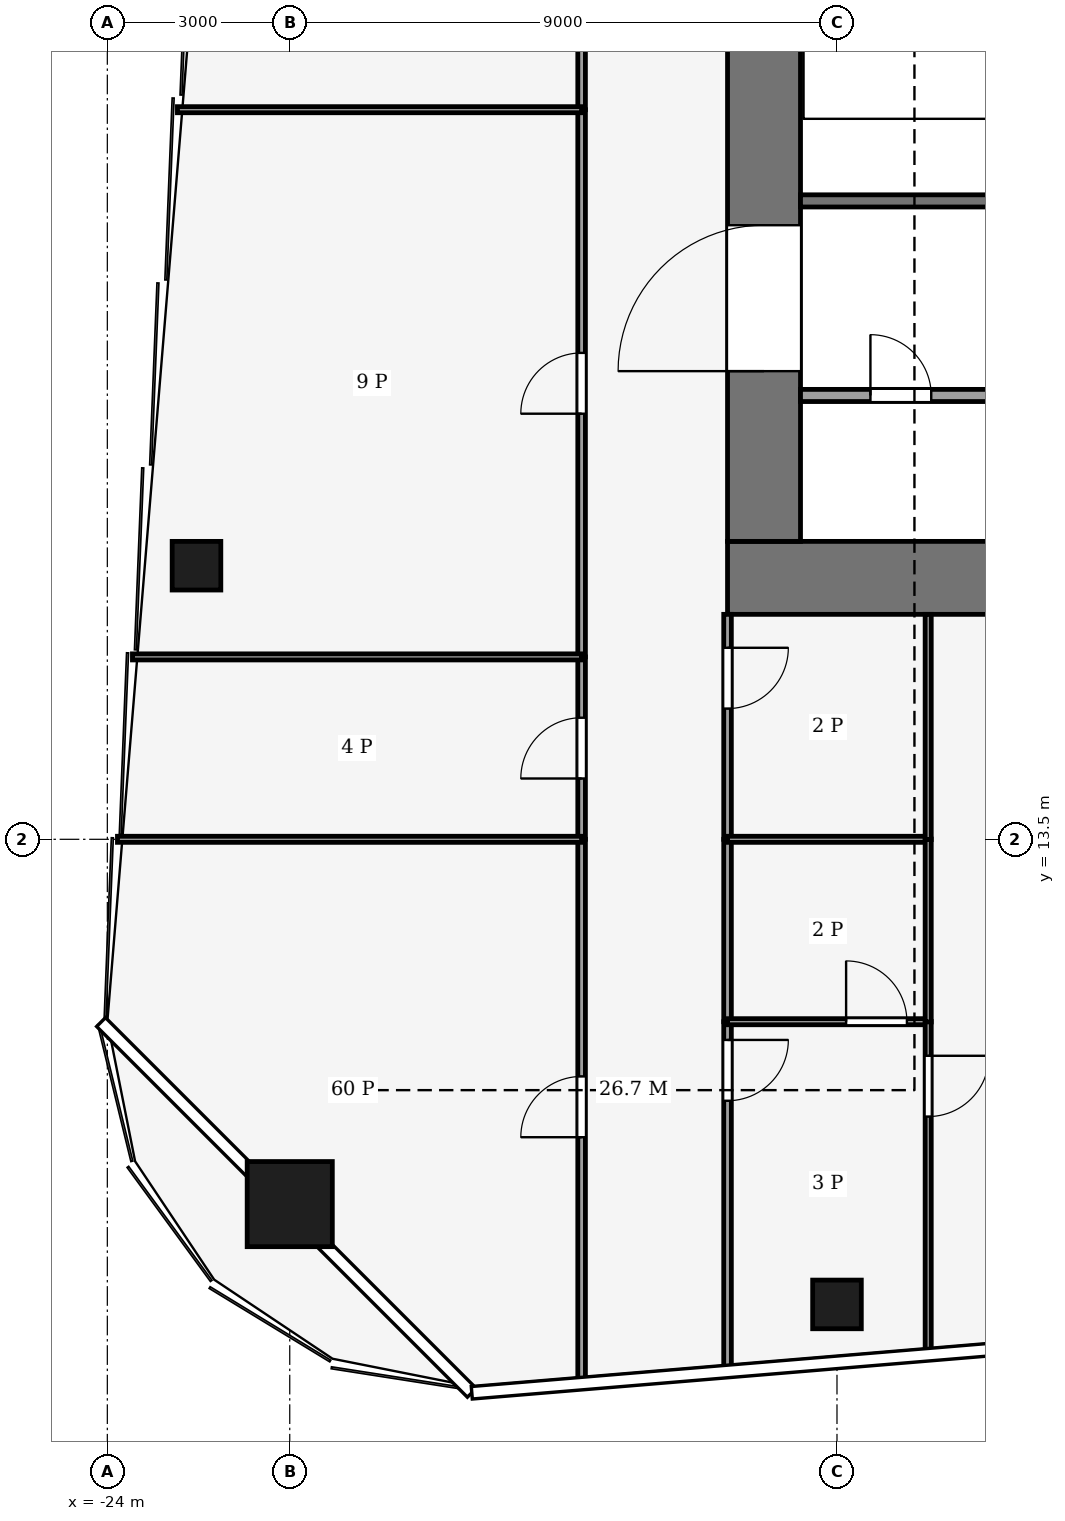
"""IFC4 building model, lengths in metres.
Left out: names, types, materials, properties, quantities, classifications, styles, units other than length and angle.
Written with IfcOpenShell. Run it as: python <this file> out.ifc"""

import sys

from ifc_helpers import new_model, si_unit, direction, frame, frame_2d, origin, origin_2d, place, context, subcontext, project, spatial, rectangle, hollow_rectangle, extrude, element, fill, save


model = new_model("IFC4")
c1 = context("Model", 3, precision=1e-05, world=origin(), true_north=direction((0.0, 1.0)))
c2 = subcontext(c1, "Body", "Model", "MODEL_VIEW")
j1 = project(units=[si_unit("LENGTHUNIT", "METRE"), si_unit("PLANEANGLEUNIT", "RADIAN")], contexts=[c1])
p1 = place(None, origin())
s1 = spatial("IfcSite", under=j1, at=p1, CompositionType="ELEMENT")
p2 = place(p1, origin())
s2 = spatial("IfcBuilding", under=s1, at=p2, CompositionType="ELEMENT")
p3 = place(p2, frame((0.0, 0.0, 90.0)))
s3 = spatial("IfcBuildingStorey", under=s2, at=p3, CompositionType="ELEMENT", Elevation=90.0)
p4 = place(p3, frame((-13.8, 17.8, -0.13), z_axis=(0.0, 0.0, 1.0), x_axis=(1.0, 0.0, 0.0)))
e1 = element("IfcWall", 1, at=p4, inside=s3, PredefinedType="SHEAR", context=c2, shape_type="SweptSolid", body=[
    extrude(rectangle(XDim=27.6, YDim=1.2, at=frame_2d((13.8, 0.0))), origin(), (0.0, 0.0, 1.0), 4.0),
])
p5 = place(p3, frame((-13.2, 18.4, -0.13), z_axis=(0.0, 0.0, 1.0), x_axis=(0.0, 1.0, 0.0)))
e2 = element("IfcWall", 2, at=p5, inside=s3, PredefinedType="SHEAR", context=c2, shape_type="SweptSolid", body=[
    extrude(rectangle(XDim=19.2, YDim=1.2, at=frame_2d((9.6, 0.0))), origin(), (0.0, 0.0, 1.0), 4.0),
])
p6 = place(p5, frame((2.8, 0.0, 0.13)))
e3 = element("IfcOpeningElement", 3, at=p6, cuts=e2, PredefinedType="OPENING", context=c2, shape_type="SweptSolid", body=[
    extrude(rectangle(XDim=2.4, YDim=2.4, at=frame_2d((1.2, 1.2))), frame((0.0, 0.61, 0.0), z_axis=(0.0, -1.0, 0.0), x_axis=(1.0, 0.0, 0.0)), (0.0, 0.0, 1.0), 1.22),
])
p7 = place(p5, frame((13.4, 0.0, 0.13)))
e4 = element("IfcOpeningElement", 4, at=p7, cuts=e2, PredefinedType="OPENING", context=c2, shape_type="SweptSolid", body=[
    extrude(rectangle(XDim=1.4, YDim=2.2, at=frame_2d((0.7, 1.1))), frame((0.0, 0.61, 0.0), z_axis=(0.0, -1.0, 0.0), x_axis=(1.0, 0.0, 0.0)), (0.0, 0.0, 1.0), 1.22),
])
p8 = place(p3, frame((-21.0, 7.5, 0.0), z_axis=(0.0, 0.0, 1.0), x_axis=(1.0, 0.0, 0.0)))
e5 = element("IfcColumn", 5, at=p8, inside=s3, PredefinedType="COLUMN", context=c2, shape_type="SweptSolid", body=[
    extrude(hollow_rectangle(XDim=1.4, YDim=1.4, WallThickness=0.08, at=origin_2d()), origin(), (0.0, 0.0, 1.0), 4.0),
])
for number, where, z_axis, x_axis in (
    (6, (-12.0, 5.85, 0.0), (0.0, 0.0, 1.0), (1.0, 0.0, 0.0)),
    (7, (-22.534, 18.0, 0.0), (0.0, 0.0, 1.0), (1.0, 0.0, 0.0)),
):
    element("IfcColumn", number, at=place(p3, frame(where, z_axis=z_axis, x_axis=x_axis)), inside=s3, PredefinedType="COLUMN", context=c2, shape_type="SweptSolid", body=[
        extrude(hollow_rectangle(XDim=0.8, YDim=0.8, WallThickness=0.04, at=origin_2d()), origin(), (0.0, 0.0, 1.0), 4.0),
    ])
p9 = place(p3, frame((-12.6, 20.8, 0.0), z_axis=(0.0, 0.0, 1.0), x_axis=(1.0, 0.0, 0.0)))
e8 = element("IfcWall", 8, at=p9, inside=s3, PredefinedType="PARTITIONING", context=c2, shape_type="SweptSolid", body=[
    extrude(rectangle(XDim=6.6, YDim=0.2, at=frame_2d((3.3, 0.0))), origin(), (0.0, 0.0, 1.0), 3.87),
])
p10 = place(p9, frame((1.15, 0.0, 0.0)))
e9 = element("IfcOpeningElement", 9, at=p10, cuts=e8, PredefinedType="OPENING", context=c2, shape_type="SweptSolid", body=[
    extrude(rectangle(XDim=1.0, YDim=2.1, at=frame_2d((0.5, 1.05))), frame((0.0, 0.11, 0.0), z_axis=(0.0, -1.0, 0.0), x_axis=(1.0, 0.0, 0.0)), (0.0, 0.0, 1.0), 0.22),
])
p11 = place(p9, frame((4.45, 0.0, 0.0)))
e10 = element("IfcOpeningElement", 10, at=p11, cuts=e8, PredefinedType="OPENING", context=c2, shape_type="SweptSolid", body=[
    extrude(rectangle(XDim=1.0, YDim=2.1, at=frame_2d((0.5, 1.05))), frame((0.0, 0.11, 0.0), z_axis=(0.0, -1.0, 0.0), x_axis=(1.0, 0.0, 0.0)), (0.0, 0.0, 1.0), 0.22),
])
p12 = place(p3, frame((-12.6, 24.0, 0.0), z_axis=(0.0, 0.0, 1.0), x_axis=(1.0, 0.0, 0.0)))
e11 = element("IfcWall", 11, at=p12, inside=s3, PredefinedType="PARTITIONING", context=c2, shape_type="SweptSolid", body=[
    extrude(rectangle(XDim=6.6, YDim=0.2, at=frame_2d((3.3, 0.0))), origin(), (0.0, 0.0, 1.0), 3.87),
])
p13 = place(p12, frame((4.1, 0.0, 0.0)))
e12 = element("IfcOpeningElement", 12, at=p13, cuts=e11, PredefinedType="OPENING", context=c2, shape_type="SweptSolid", body=[
    extrude(rectangle(XDim=0.8, YDim=2.1, at=frame_2d((0.4, 1.05))), frame((0.0, 0.11, 0.0), z_axis=(0.0, -1.0, 0.0), x_axis=(1.0, 0.0, 0.0)), (0.0, 0.0, 1.0), 0.22),
])
p14 = place(p12, frame((5.5, 0.0, 0.0)))
e13 = element("IfcOpeningElement", 13, at=p14, cuts=e11, PredefinedType="OPENING", context=c2, shape_type="SweptSolid", body=[
    extrude(rectangle(XDim=0.8, YDim=2.1, at=frame_2d((0.4, 1.05))), frame((0.0, 0.11, 0.0), z_axis=(0.0, -1.0, 0.0), x_axis=(1.0, 0.0, 0.0)), (0.0, 0.0, 1.0), 0.22),
])
p15 = place(p3, frame((-16.2, 4.57, 0.0), z_axis=(0.0, 0.0, 1.0), x_axis=(0.0, 1.0, 0.0)))
e14 = element("IfcWall", 14, at=p15, inside=s3, PredefinedType="PARTITIONING", context=c2, shape_type="SweptSolid", body=[
    extrude(rectangle(XDim=8.93, YDim=0.125, at=frame_2d((4.465, 0.0))), origin(), (0.0, 0.0, 1.0), 3.04),
])
p16 = place(p15, frame((4.03, 0.0, 0.0)))
e15 = element("IfcOpeningElement", 15, at=p16, cuts=e14, PredefinedType="OPENING", context=c2, shape_type="SweptSolid", body=[
    extrude(rectangle(XDim=1.0, YDim=2.1, at=frame_2d((0.5, 1.05))), frame((0.0, 0.073, 0.0), z_axis=(0.0, -1.0, 0.0), x_axis=(1.0, 0.0, 0.0)), (0.0, 0.0, 1.0), 0.145),
])
p17 = place(p3, frame((-16.2, 13.5, 0.0), z_axis=(0.0, 0.0, 1.0), x_axis=(0.0, 1.0, 0.0)))
e16 = element("IfcWall", 16, at=p17, inside=s3, PredefinedType="PARTITIONING", context=c2, shape_type="SweptSolid", body=[
    extrude(rectangle(XDim=3.0, YDim=0.125, at=frame_2d((1.5, 0.0))), origin(), (0.0, 0.0, 1.0), 3.87),
])
p18 = place(p17, frame((1.0, 0.0, 0.0)))
e17 = element("IfcOpeningElement", 17, at=p18, cuts=e16, PredefinedType="OPENING", context=c2, shape_type="SweptSolid", body=[
    extrude(rectangle(XDim=1.0, YDim=2.1, at=frame_2d((0.5, 1.05))), frame((0.0, 0.073, 0.0), z_axis=(0.0, -1.0, 0.0), x_axis=(1.0, 0.0, 0.0)), (0.0, 0.0, 1.0), 0.145),
])
p19 = place(p3, frame((-16.2, 16.5, 0.0), z_axis=(0.0, 0.0, 1.0), x_axis=(0.0, 1.0, 0.0)))
e18 = element("IfcWall", 18, at=p19, inside=s3, PredefinedType="PARTITIONING", context=c2, shape_type="SweptSolid", body=[
    extrude(rectangle(XDim=9.0, YDim=0.125, at=frame_2d((4.5, 0.0))), origin(), (0.0, 0.0, 1.0), 3.14),
])
p20 = place(p19, frame((4.0, 0.0, 0.0)))
e19 = element("IfcOpeningElement", 19, at=p20, cuts=e18, PredefinedType="OPENING", context=c2, shape_type="SweptSolid", body=[
    extrude(rectangle(XDim=1.0, YDim=2.1, at=frame_2d((0.5, 1.05))), frame((0.0, 0.073, 0.0), z_axis=(0.0, -1.0, 0.0), x_axis=(1.0, 0.0, 0.0)), (0.0, 0.0, 1.0), 0.145),
])
p21 = place(p3, frame((-16.2, 25.5, 0.0), z_axis=(0.0, 0.0, 1.0), x_axis=(0.0, 1.0, 0.0)))
e20 = element("IfcWall", 20, at=p21, inside=s3, PredefinedType="PARTITIONING", context=c2, shape_type="SweptSolid", body=[
    extrude(rectangle(XDim=12.0, YDim=0.125, at=frame_2d((6.0, 0.0))), origin(), (0.0, 0.0, 1.0), 3.48),
])
p22 = place(p21, frame((5.5, 0.0, 0.0)))
e21 = element("IfcOpeningElement", 21, at=p22, cuts=e20, PredefinedType="OPENING", context=c2, shape_type="SweptSolid", body=[
    extrude(rectangle(XDim=1.0, YDim=2.1, at=frame_2d((0.5, 1.05))), frame((0.0, 0.073, 0.0), z_axis=(0.0, -1.0, 0.0), x_axis=(1.0, 0.0, 0.0)), (0.0, 0.0, 1.0), 0.145),
])
p23 = place(p3, frame((-13.8, 10.5, 0.0), z_axis=(0.0, 0.0, 1.0), x_axis=(0.0, -1.0, 0.0)))
e22 = element("IfcWall", 22, at=p23, inside=s3, PredefinedType="PARTITIONING", context=c2, shape_type="SweptSolid", body=[
    extrude(rectangle(XDim=5.73, YDim=0.125, at=frame_2d((2.865, 0.0))), origin(), (0.0, 0.0, 1.0), 3.04),
])
p24 = place(p23, frame((0.3, 0.0, 0.0)))
e23 = element("IfcOpeningElement", 23, at=p24, cuts=e22, PredefinedType="OPENING", context=c2, shape_type="SweptSolid", body=[
    extrude(rectangle(XDim=1.0, YDim=2.1, at=frame_2d((0.5, 1.05))), frame((0.0, 0.073, 0.0), z_axis=(0.0, -1.0, 0.0), x_axis=(1.0, 0.0, 0.0)), (0.0, 0.0, 1.0), 0.145),
])
p25 = place(p3, frame((-13.8, 10.5, 0.0), z_axis=(0.0, 0.0, 1.0), x_axis=(0.0, 1.0, 0.0)))
e24 = element("IfcWall", 24, at=p25, inside=s3, PredefinedType="PARTITIONING", context=c2, shape_type="SweptSolid", body=[
    extrude(rectangle(XDim=3.0, YDim=0.125, at=frame_2d((1.5, 0.0))), origin(), (0.0, 0.0, 1.0), 3.87),
])
p26 = place(p3, frame((-13.8, 17.2, 0.0), z_axis=(0.0, 0.0, 1.0), x_axis=(0.0, -1.0, 0.0)))
e25 = element("IfcWall", 25, at=p26, inside=s3, PredefinedType="PARTITIONING", context=c2, shape_type="SweptSolid", body=[
    extrude(rectangle(XDim=3.7, YDim=0.125, at=frame_2d((1.85, 0.0))), origin(), (0.0, 0.0, 1.0), 3.14),
])
p27 = place(p26, frame((0.55, 0.0, 0.0)))
e26 = element("IfcOpeningElement", 26, at=p27, cuts=e25, PredefinedType="OPENING", context=c2, shape_type="SweptSolid", body=[
    extrude(rectangle(XDim=1.0, YDim=2.1, at=frame_2d((0.5, 1.05))), frame((0.0, 0.073, 0.0), z_axis=(0.0, -1.0, 0.0), x_axis=(1.0, 0.0, 0.0)), (0.0, 0.0, 1.0), 0.145),
])
p28 = place(p3, frame((-16.2, 13.5, 0.0), z_axis=(0.0, 0.0, 1.0), x_axis=(-1.0, 0.0, 0.0)))
e27 = element("IfcWall", 27, at=p28, inside=s3, PredefinedType="PARTITIONING", context=c2, shape_type="SweptSolid", body=[
    extrude(rectangle(XDim=7.634, YDim=0.1, at=frame_2d((3.817, 0.0))), origin(), (0.0, 0.0, 1.0), 3.04),
])
p29 = place(p3, frame((-16.2, 16.5, 0.0), z_axis=(0.0, 0.0, 1.0), x_axis=(-1.0, 0.0, 0.0)))
e28 = element("IfcWall", 28, at=p29, inside=s3, PredefinedType="PARTITIONING", context=c2, shape_type="SweptSolid", body=[
    extrude(rectangle(XDim=7.387, YDim=0.1, at=frame_2d((3.693, 0.0))), origin(), (0.0, 0.0, 1.0), 3.04),
])
p30 = place(p3, frame((-16.2, 25.5, 0.0), z_axis=(0.0, 0.0, 1.0), x_axis=(-1.0, 0.0, 0.0)))
e29 = element("IfcWall", 29, at=p30, inside=s3, PredefinedType="PARTITIONING", context=c2, shape_type="SweptSolid", body=[
    extrude(rectangle(XDim=6.647, YDim=0.1, at=frame_2d((3.324, 0.0))), origin(), (0.0, 0.0, 1.0), 3.04),
])
p31 = place(p3, frame((-13.8, 10.5, 0.0), z_axis=(0.0, 0.0, 1.0), x_axis=(1.0, 0.0, 0.0)))
e30 = element("IfcWall", 30, at=p31, inside=s3, PredefinedType="PARTITIONING", context=c2, shape_type="SweptSolid", body=[
    extrude(rectangle(XDim=3.3, YDim=0.1, at=frame_2d((1.65, 0.0))), origin(), (0.0, 0.0, 1.0), 3.44),
])
p32 = place(p31, frame((1.95, 0.0, 0.0)))
e31 = element("IfcOpeningElement", 31, at=p32, cuts=e30, PredefinedType="OPENING", context=c2, shape_type="SweptSolid", body=[
    extrude(rectangle(XDim=1.0, YDim=2.1, at=frame_2d((0.5, 1.05))), frame((0.0, 0.06, 0.0), z_axis=(0.0, -1.0, 0.0), x_axis=(1.0, 0.0, 0.0)), (0.0, 0.0, 1.0), 0.12),
])
p33 = place(p3, frame((-10.5, 10.504, 0.0), z_axis=(0.0, 0.0, 1.0), x_axis=(0.0, -1.0, 0.0)))
e32 = element("IfcWall", 32, at=p33, inside=s3, PredefinedType="PARTITIONING", context=c2, shape_type="SweptSolid", body=[
    extrude(rectangle(XDim=5.459, YDim=0.1, at=frame_2d((2.729, 0.0))), origin(), (0.0, 0.0, 1.0), 3.04),
])
p34 = place(p33, frame((0.564, 0.0, 0.0)))
e33 = element("IfcOpeningElement", 33, at=p34, cuts=e32, PredefinedType="OPENING", context=c2, shape_type="SweptSolid", body=[
    extrude(rectangle(XDim=1.0, YDim=2.1, at=frame_2d((0.5, 1.05))), frame((0.0, 0.06, 0.0), z_axis=(0.0, -1.0, 0.0), x_axis=(1.0, 0.0, 0.0)), (0.0, 0.0, 1.0), 0.12),
])
p35 = place(p3, frame((-10.5, 13.5, 0.0), z_axis=(0.0, 0.0, 1.0), x_axis=(-1.0, 0.0, 0.0)))
e34 = element("IfcWall", 34, at=p35, inside=s3, PredefinedType="PARTITIONING", context=c2, shape_type="SweptSolid", body=[
    extrude(rectangle(XDim=3.3, YDim=0.1, at=frame_2d((1.65, 0.0))), origin(), (0.0, 0.0, 1.0), 3.44),
])
p36 = place(p3, frame((-10.5, 10.496, 0.0), z_axis=(0.0, 0.0, 1.0), x_axis=(0.0, 1.0, 0.0)))
e35 = element("IfcWall", 35, at=p36, inside=s3, PredefinedType="PARTITIONING", context=c2, shape_type="SweptSolid", body=[
    extrude(rectangle(XDim=3.008, YDim=0.1, at=frame_2d((1.504, 0.0))), origin(), (0.0, 0.0, 1.0), 3.87),
])
p37 = place(p3, frame((-10.5, 13.496, 0.0), z_axis=(0.0, 0.0, 1.0), x_axis=(0.0, 1.0, 0.0)))
e36 = element("IfcWall", 36, at=p37, inside=s3, PredefinedType="PARTITIONING", context=c2, shape_type="SweptSolid", body=[
    extrude(rectangle(XDim=3.704, YDim=0.1, at=frame_2d((1.852, 0.0))), origin(), (0.0, 0.0, 1.0), 3.87),
])
p38 = place(p10, origin())
e37 = element("IfcDoor", 37, at=p38, inside=s3, OperationType="SINGLE_SWING_LEFT", PredefinedType="DOOR", context=c2, shape_type="SweptSolid", body=[
    extrude(rectangle(XDim=1.0, YDim=2.1, at=frame_2d((0.5, 1.05))), frame((0.0, 0.025, 0.0), z_axis=(0.0, -1.0, 0.0), x_axis=(1.0, 0.0, 0.0)), (0.0, 0.0, 1.0), 0.05),
])
fill(e9, e37)
p39 = place(p6, origin())
e38 = element("IfcDoor", 38, at=p39, inside=s3, OperationType="DOUBLE_DOOR_SINGLE_SWING", PredefinedType="DOOR", context=c2, shape_type="SweptSolid", body=[
    extrude(rectangle(XDim=2.4, YDim=2.4, at=frame_2d((1.2, 1.2))), frame((0.0, 0.025, 0.0), z_axis=(0.0, -1.0, 0.0), x_axis=(1.0, 0.0, 0.0)), (0.0, 0.0, 1.0), 0.05),
])
fill(e3, e38)
p40 = place(p16, origin())
e39 = element("IfcDoor", 39, at=p40, inside=s3, OperationType="SINGLE_SWING_RIGHT", PredefinedType="DOOR", context=c2, shape_type="SweptSolid", body=[
    extrude(rectangle(XDim=1.0, YDim=2.1, at=frame_2d((0.5, 1.05))), frame((0.0, 0.025, 0.0), z_axis=(0.0, -1.0, 0.0), x_axis=(1.0, 0.0, 0.0)), (0.0, 0.0, 1.0), 0.05),
])
fill(e15, e39)
p41 = place(p18, origin())
e40 = element("IfcDoor", 40, at=p41, inside=s3, OperationType="SINGLE_SWING_RIGHT", PredefinedType="DOOR", context=c2, shape_type="SweptSolid", body=[
    extrude(rectangle(XDim=1.0, YDim=2.1, at=frame_2d((0.5, 1.05))), frame((0.0, 0.025, 0.0), z_axis=(0.0, -1.0, 0.0), x_axis=(1.0, 0.0, 0.0)), (0.0, 0.0, 1.0), 0.05),
])
fill(e17, e40)
p42 = place(p20, origin())
e41 = element("IfcDoor", 41, at=p42, inside=s3, OperationType="SINGLE_SWING_LEFT", PredefinedType="DOOR", context=c2, shape_type="SweptSolid", body=[
    extrude(rectangle(XDim=1.0, YDim=2.1, at=frame_2d((0.5, 1.05))), frame((0.0, 0.025, 0.0), z_axis=(0.0, -1.0, 0.0), x_axis=(1.0, 0.0, 0.0)), (0.0, 0.0, 1.0), 0.05),
])
fill(e19, e41)
p43 = place(p24, origin())
e42 = element("IfcDoor", 42, at=p43, inside=s3, OperationType="SINGLE_SWING_LEFT", PredefinedType="DOOR", context=c2, shape_type="SweptSolid", body=[
    extrude(rectangle(XDim=1.0, YDim=2.1, at=frame_2d((0.5, 1.05))), frame((0.0, 0.025, 0.0), z_axis=(0.0, -1.0, 0.0), x_axis=(1.0, 0.0, 0.0)), (0.0, 0.0, 1.0), 0.05),
])
fill(e23, e42)
p44 = place(p27, origin())
e43 = element("IfcDoor", 43, at=p44, inside=s3, OperationType="SINGLE_SWING_LEFT", PredefinedType="DOOR", context=c2, shape_type="SweptSolid", body=[
    extrude(rectangle(XDim=1.0, YDim=2.1, at=frame_2d((0.5, 1.05))), frame((0.0, 0.025, 0.0), z_axis=(0.0, -1.0, 0.0), x_axis=(1.0, 0.0, 0.0)), (0.0, 0.0, 1.0), 0.05),
])
fill(e26, e43)
p45 = place(p32, origin())
e44 = element("IfcDoor", 44, at=p45, inside=s3, OperationType="SINGLE_SWING_RIGHT", PredefinedType="DOOR", context=c2, shape_type="SweptSolid", body=[
    extrude(rectangle(XDim=1.0, YDim=2.1, at=frame_2d((0.5, 1.05))), frame((0.0, 0.025, 0.0), z_axis=(0.0, -1.0, 0.0), x_axis=(1.0, 0.0, 0.0)), (0.0, 0.0, 1.0), 0.05),
])
fill(e31, e44)
p46 = place(p34, origin())
e45 = element("IfcDoor", 45, at=p46, inside=s3, OperationType="SINGLE_SWING_LEFT", PredefinedType="DOOR", context=c2, shape_type="SweptSolid", body=[
    extrude(rectangle(XDim=1.0, YDim=2.1, at=frame_2d((0.5, 1.05))), frame((0.0, 0.025, 0.0), z_axis=(0.0, -1.0, 0.0), x_axis=(1.0, 0.0, 0.0)), (0.0, 0.0, 1.0), 0.05),
])
fill(e33, e45)
save(model, sys.argv[1])
